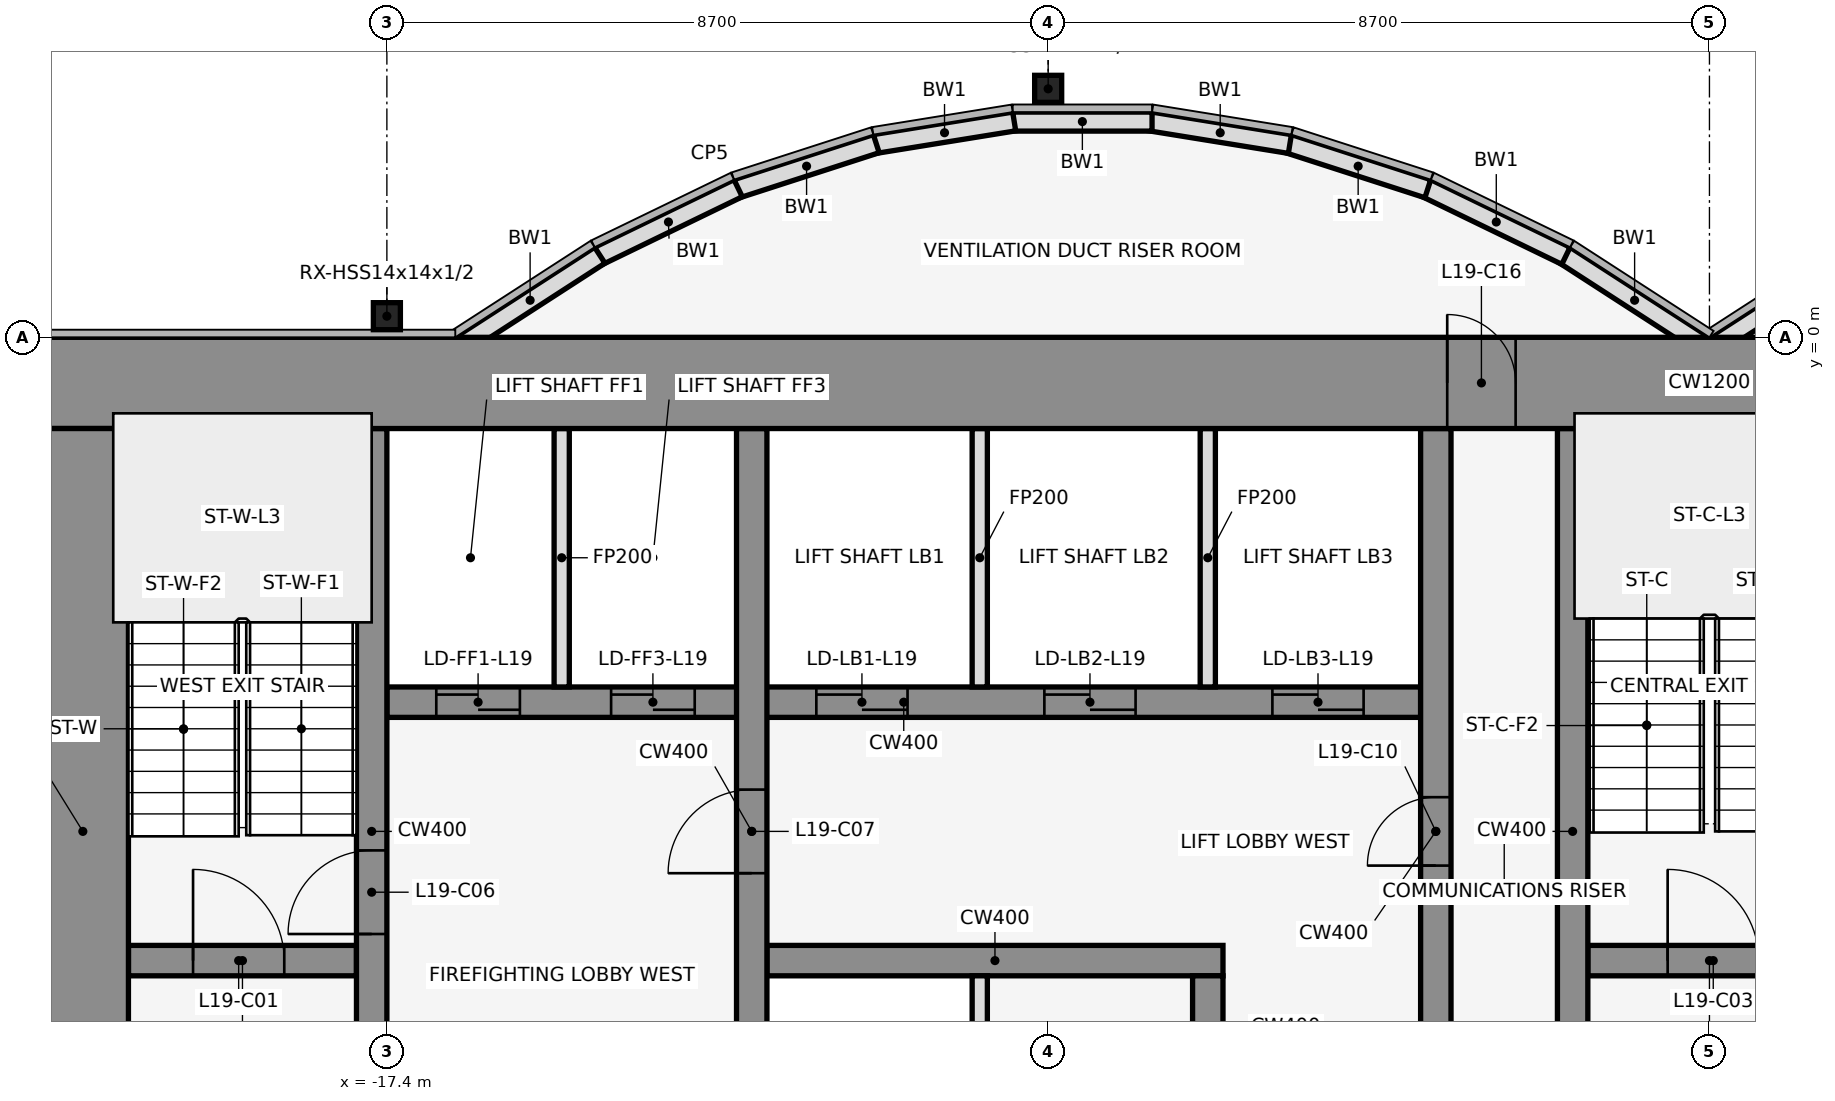
"""IFC4 building model, lengths in metres.
Left out: names, types, materials, properties, quantities, classifications, styles, units other than length and angle.
Written with IfcOpenShell. Run it as: python <this file> out.ifc"""

import sys

from ifc_helpers import new_model, si_unit, direction, frame, frame_2d, origin, origin_2d, place, context, subcontext, project, spatial, rectangle, hollow_rectangle, extrude, element, fill, save


model = new_model("IFC4")
c1 = context("Model", 3, precision=1e-05, world=origin(), true_north=direction((0.0, 1.0)))
c2 = subcontext(c1, "Body", "Model", "MODEL_VIEW")
j1 = project(units=[si_unit("LENGTHUNIT", "METRE"), si_unit("PLANEANGLEUNIT", "RADIAN")], contexts=[c1])
p1 = place(None, origin())
s1 = spatial("IfcSite", under=j1, at=p1, CompositionType="ELEMENT")
p2 = place(p1, origin())
s2 = spatial("IfcBuilding", under=s1, at=p2, CompositionType="ELEMENT")
p3 = place(p2, frame((0.0, 0.0, 94.0)))
s3 = spatial("IfcBuildingStorey", under=s2, at=p3, CompositionType="ELEMENT", Elevation=94.0)
for number, where, z_axis, x_axis in (
    (1, (-8.7, 3.269, 0.0), (0.0, 0.0, 1.0), (1.0, 0.0, 0.0)),
    (2, (-17.4, 0.278, 0.0), (0.0, 0.0, 1.0), (1.0, 0.0, 0.0)),
):
    element("IfcColumn", number, at=place(p3, frame(where, z_axis=z_axis, x_axis=x_axis)), inside=s3, PredefinedType="COLUMN", context=c2, shape_type="SweptSolid", body=[
        extrude(hollow_rectangle(XDim=0.356, YDim=0.356, WallThickness=0.012, at=origin_2d()), origin(), (0.0, 0.0, 1.0), 4.1),
    ])
for number, where, z_axis, x_axis in (
    (3, (1.901, 1.08, 0.0), (0.0, 0.0, 1.0), (-0.84, -0.543, 0.0)),
    (4, (-0.068, -0.105, 0.0), (0.0, 0.0, 1.0), (-0.84, 0.543, 0.0)),
):
    element("IfcWall", number, at=place(p3, frame(where, z_axis=z_axis, x_axis=x_axis)), inside=s3, PredefinedType="STANDARD", context=c2, shape_type="SweptSolid", body=[
        extrude(rectangle(XDim=2.183, YDim=0.25, at=frame_2d((1.091, 0.0))), origin(), (0.0, 0.0, 1.0), 3.95),
    ])
p4 = place(p3, frame((-1.888, 1.073, 0.0), z_axis=(0.0, 0.0, 1.0), x_axis=(-0.89982408427, 0.436252928206, 0.0)))
e5 = element("IfcWall", 5, at=p4, inside=s3, PredefinedType="STANDARD", context=c2, shape_type="SweptSolid", body=[
    extrude(rectangle(XDim=2.038, YDim=0.25, at=frame_2d((1.019, 0.0))), origin(), (0.0, 0.0, 1.0), 3.95),
])
p5 = place(p3, frame((-3.705, 1.955, 0.0), z_axis=(0.0, 0.0, 1.0), x_axis=(-0.951495806175, 0.307661714928, 0.0)))
e6 = element("IfcWall", 6, at=p5, inside=s3, PredefinedType="STANDARD", context=c2, shape_type="SweptSolid", body=[
    extrude(rectangle(XDim=1.927, YDim=0.25, at=frame_2d((0.963, 0.0))), origin(), (0.0, 0.0, 1.0), 3.95),
])
p6 = place(p3, frame((-5.52, 2.543, 0.0), z_axis=(0.0, 0.0, 1.0), x_axis=(-0.987181718931, 0.159600293885, 0.0)))
e7 = element("IfcWall", 7, at=p6, inside=s3, PredefinedType="STANDARD", context=c2, shape_type="SweptSolid", body=[
    extrude(rectangle(XDim=1.857, YDim=0.25, at=frame_2d((0.929, 0.0))), origin(), (0.0, 0.0, 1.0), 3.95),
])
p7 = place(p3, frame((-7.333, 2.838, 0.0), z_axis=(0.0, 0.0, 1.0), x_axis=(-1.0, 0.0, 0.0)))
e8 = element("IfcWall", 8, at=p7, inside=s3, PredefinedType="STANDARD", context=c2, shape_type="SweptSolid", body=[
    extrude(rectangle(XDim=1.833, YDim=0.25, at=frame_2d((0.917, 0.0))), origin(), (0.0, 0.0, 1.0), 3.95),
])
p8 = place(p3, frame((-9.147, 2.84, 0.0), z_axis=(0.0, 0.0, 1.0), x_axis=(-0.987181718931, -0.159600293885, 0.0)))
e9 = element("IfcWall", 9, at=p8, inside=s3, PredefinedType="STANDARD", context=c2, shape_type="SweptSolid", body=[
    extrude(rectangle(XDim=1.857, YDim=0.25, at=frame_2d((0.929, 0.0))), origin(), (0.0, 0.0, 1.0), 3.95),
])
p9 = place(p3, frame((-10.962, 2.548, 0.0), z_axis=(0.0, 0.0, 1.0), x_axis=(-0.951495806175, -0.307661714928, 0.0)))
e10 = element("IfcWall", 10, at=p9, inside=s3, PredefinedType="STANDARD", context=c2, shape_type="SweptSolid", body=[
    extrude(rectangle(XDim=1.927, YDim=0.25, at=frame_2d((0.963, 0.0))), origin(), (0.0, 0.0, 1.0), 3.95),
])
p10 = place(p3, frame((-12.779, 1.962, 0.0), z_axis=(0.0, 0.0, 1.0), x_axis=(-0.89982408427, -0.436252928206, 0.0)))
e11 = element("IfcWall", 11, at=p10, inside=s3, PredefinedType="STANDARD", context=c2, shape_type="SweptSolid", body=[
    extrude(rectangle(XDim=2.038, YDim=0.25, at=frame_2d((1.019, 0.0))), origin(), (0.0, 0.0, 1.0), 3.95),
])
p11 = place(p3, frame((-14.599, 1.08, 0.0), z_axis=(0.0, 0.0, 1.0), x_axis=(-0.83981312244, -0.542875602121, 0.0)))
e12 = element("IfcWall", 12, at=p11, inside=s3, PredefinedType="STANDARD", context=c2, shape_type="SweptSolid", body=[
    extrude(rectangle(XDim=2.183, YDim=0.25, at=frame_2d((1.091, 0.0))), origin(), (0.0, 0.0, 1.0), 3.95),
])
p12 = place(p3, frame((-20.8, -8.2, 0.0), z_axis=(0.0, 0.0, 1.0), x_axis=(1.0, 0.0, 0.0)))
e13 = element("IfcWall", 13, at=p12, inside=s3, PredefinedType="SHEAR", context=c2, shape_type="SweptSolid", body=[
    extrude(rectangle(XDim=3.0, YDim=0.4, at=frame_2d((1.5, 0.0))), origin(), (0.0, 0.0, 1.0), 4.1),
])
p13 = place(p12, frame((0.85, 0.0, 0.0)))
e14 = element("IfcOpeningElement", 14, at=p13, cuts=e13, PredefinedType="OPENING", context=c2, shape_type="SweptSolid", body=[
    extrude(rectangle(XDim=1.2, YDim=2.1, at=frame_2d((0.6, 1.05))), frame((0.0, 0.212, 0.0), z_axis=(0.0, -1.0, 0.0), x_axis=(1.0, 0.0, 0.0)), (0.0, 0.0, 1.0), 0.424),
])
p14 = place(p3, frame((-12.4, -8.2, 0.0), z_axis=(0.0, 0.0, 1.0), x_axis=(1.0, 0.0, 0.0)))
e15 = element("IfcWall", 15, at=p14, inside=s3, PredefinedType="SHEAR", context=c2, shape_type="SweptSolid", body=[
    extrude(rectangle(XDim=6.0, YDim=0.4, at=frame_2d((3.0, 0.0))), origin(), (0.0, 0.0, 1.0), 4.1),
])
p15 = place(p3, frame((-1.6, -8.2, 0.0), z_axis=(0.0, 0.0, 1.0), x_axis=(1.0, 0.0, 0.0)))
e16 = element("IfcWall", 16, at=p15, inside=s3, PredefinedType="SHEAR", context=c2, shape_type="SweptSolid", body=[
    extrude(rectangle(XDim=3.2, YDim=0.4, at=frame_2d((1.6, 0.0))), origin(), (0.0, 0.0, 1.0), 4.1),
])
p16 = place(p15, frame((1.05, 0.0, 0.0)))
e17 = element("IfcOpeningElement", 17, at=p16, cuts=e16, PredefinedType="OPENING", context=c2, shape_type="SweptSolid", body=[
    extrude(rectangle(XDim=1.2, YDim=2.1, at=frame_2d((0.6, 1.05))), frame((0.0, 0.212, 0.0), z_axis=(0.0, -1.0, 0.0), x_axis=(1.0, 0.0, 0.0)), (0.0, 0.0, 1.0), 0.424),
])
p17 = place(p3, frame((-17.4, -4.8, 0.0), z_axis=(0.0, 0.0, 1.0), x_axis=(1.0, 0.0, 0.0)))
e18 = element("IfcWall", 18, at=p17, inside=s3, PredefinedType="SHEAR", context=c2, shape_type="SweptSolid", body=[
    extrude(rectangle(XDim=13.6, YDim=0.4, at=frame_2d((6.8, 0.0))), origin(), (0.0, 0.0, 1.0), 4.1),
])
p18 = place(p17, frame((0.65, 0.0, 0.0)))
e19 = element("IfcOpeningElement", 19, at=p18, cuts=e18, PredefinedType="OPENING", context=c2, shape_type="SweptSolid", body=[
    extrude(rectangle(XDim=1.1, YDim=2.1, at=frame_2d((0.55, 1.05))), frame((0.0, 0.212, 0.0), z_axis=(0.0, -1.0, 0.0), x_axis=(1.0, 0.0, 0.0)), (0.0, 0.0, 1.0), 0.424),
])
p19 = place(p17, frame((2.95, 0.0, 0.0)))
e20 = element("IfcOpeningElement", 20, at=p19, cuts=e18, PredefinedType="OPENING", context=c2, shape_type="SweptSolid", body=[
    extrude(rectangle(XDim=1.1, YDim=2.1, at=frame_2d((0.55, 1.05))), frame((0.0, 0.212, 0.0), z_axis=(0.0, -1.0, 0.0), x_axis=(1.0, 0.0, 0.0)), (0.0, 0.0, 1.0), 0.424),
])
p20 = place(p17, frame((5.65, 0.0, 0.0)))
e21 = element("IfcOpeningElement", 21, at=p20, cuts=e18, PredefinedType="OPENING", context=c2, shape_type="SweptSolid", body=[
    extrude(rectangle(XDim=1.2, YDim=2.1, at=frame_2d((0.6, 1.05))), frame((0.0, 0.212, 0.0), z_axis=(0.0, -1.0, 0.0), x_axis=(1.0, 0.0, 0.0)), (0.0, 0.0, 1.0), 0.424),
])
p21 = place(p17, frame((8.65, 0.0, 0.0)))
e22 = element("IfcOpeningElement", 22, at=p21, cuts=e18, PredefinedType="OPENING", context=c2, shape_type="SweptSolid", body=[
    extrude(rectangle(XDim=1.2, YDim=2.1, at=frame_2d((0.6, 1.05))), frame((0.0, 0.212, 0.0), z_axis=(0.0, -1.0, 0.0), x_axis=(1.0, 0.0, 0.0)), (0.0, 0.0, 1.0), 0.424),
])
p22 = place(p17, frame((11.65, 0.0, 0.0)))
e23 = element("IfcOpeningElement", 23, at=p22, cuts=e18, PredefinedType="OPENING", context=c2, shape_type="SweptSolid", body=[
    extrude(rectangle(XDim=1.2, YDim=2.1, at=frame_2d((0.6, 1.05))), frame((0.0, 0.212, 0.0), z_axis=(0.0, -1.0, 0.0), x_axis=(1.0, 0.0, 0.0)), (0.0, 0.0, 1.0), 0.424),
])
p23 = place(p3, frame((-17.6, -11.8, 0.0), z_axis=(0.0, 0.0, 1.0), x_axis=(0.0, 1.0, 0.0)))
e24 = element("IfcWall", 24, at=p23, inside=s3, PredefinedType="SHEAR", context=c2, shape_type="SweptSolid", body=[
    extrude(rectangle(XDim=10.6, YDim=0.4, at=frame_2d((5.3, 0.0))), origin(), (0.0, 0.0, 1.0), 4.1),
])
p24 = place(p23, frame((1.25, 0.0, 0.0)))
e25 = element("IfcOpeningElement", 25, at=p24, cuts=e24, PredefinedType="OPENING", context=c2, shape_type="SweptSolid", body=[
    extrude(rectangle(XDim=1.1, YDim=2.1, at=frame_2d((0.55, 1.05))), frame((0.0, 0.212, 0.0), z_axis=(0.0, -1.0, 0.0), x_axis=(1.0, 0.0, 0.0)), (0.0, 0.0, 1.0), 0.424),
])
p25 = place(p23, frame((3.95, 0.0, 0.0)))
e26 = element("IfcOpeningElement", 26, at=p25, cuts=e24, PredefinedType="OPENING", context=c2, shape_type="SweptSolid", body=[
    extrude(rectangle(XDim=1.1, YDim=2.1, at=frame_2d((0.55, 1.05))), frame((0.0, 0.212, 0.0), z_axis=(0.0, -1.0, 0.0), x_axis=(1.0, 0.0, 0.0)), (0.0, 0.0, 1.0), 0.424),
])
p26 = place(p3, frame((-15.1, -4.6, 0.0), z_axis=(0.0, 0.0, 1.0), x_axis=(0.0, 1.0, 0.0)))
e27 = element("IfcWall", 27, at=p26, inside=s3, PredefinedType="PARTITIONING", context=c2, shape_type="SweptSolid", body=[
    extrude(rectangle(XDim=3.4, YDim=0.2, at=frame_2d((1.7, 0.0))), origin(), (0.0, 0.0, 1.0), 3.018),
])
p27 = place(p3, frame((-12.6, -11.8, 0.0), z_axis=(0.0, 0.0, 1.0), x_axis=(0.0, 1.0, 0.0)))
e28 = element("IfcWall", 28, at=p27, inside=s3, PredefinedType="SHEAR", context=c2, shape_type="SweptSolid", body=[
    extrude(rectangle(XDim=10.6, YDim=0.4, at=frame_2d((5.3, 0.0))), origin(), (0.0, 0.0, 1.0), 4.1),
])
p28 = place(p27, frame((4.75, 0.0, 0.0)))
e29 = element("IfcOpeningElement", 29, at=p28, cuts=e28, PredefinedType="OPENING", context=c2, shape_type="SweptSolid", body=[
    extrude(rectangle(XDim=1.1, YDim=2.1, at=frame_2d((0.55, 1.05))), frame((0.0, 0.212, 0.0), z_axis=(0.0, -1.0, 0.0), x_axis=(1.0, 0.0, 0.0)), (0.0, 0.0, 1.0), 0.424),
])
for number, where, z_axis, x_axis in (
    (30, (-9.6, -11.8, 0.0), (0.0, 0.0, 1.0), (0.0, 1.0, 0.0)),
    (31, (-9.6, -4.6, 0.0), (0.0, 0.0, 1.0), (0.0, 1.0, 0.0)),
):
    element("IfcWall", number, at=place(p3, frame(where, z_axis=z_axis, x_axis=x_axis)), inside=s3, PredefinedType="PARTITIONING", context=c2, shape_type="SweptSolid", body=[
        extrude(rectangle(XDim=3.4, YDim=0.2, at=frame_2d((1.7, 0.0))), origin(), (0.0, 0.0, 1.0), 3.018),
    ])
p29 = place(p3, frame((-6.6, -11.8, 0.0), z_axis=(0.0, 0.0, 1.0), x_axis=(0.0, 1.0, 0.0)))
e32 = element("IfcWall", 32, at=p29, inside=s3, PredefinedType="SHEAR", context=c2, shape_type="SweptSolid", body=[
    extrude(rectangle(XDim=3.4, YDim=0.4, at=frame_2d((1.7, 0.0))), origin(), (0.0, 0.0, 1.0), 4.1),
])
p30 = place(p29, frame((1.25, 0.0, 0.0)))
e33 = element("IfcOpeningElement", 33, at=p30, cuts=e32, PredefinedType="OPENING", context=c2, shape_type="SweptSolid", body=[
    extrude(rectangle(XDim=0.9, YDim=2.1, at=frame_2d((0.45, 1.05))), frame((0.0, 0.212, 0.0), z_axis=(0.0, -1.0, 0.0), x_axis=(1.0, 0.0, 0.0)), (0.0, 0.0, 1.0), 0.424),
])
p31 = place(p3, frame((-6.6, -4.6, 0.0), z_axis=(0.0, 0.0, 1.0), x_axis=(0.0, 1.0, 0.0)))
e34 = element("IfcWall", 34, at=p31, inside=s3, PredefinedType="PARTITIONING", context=c2, shape_type="SweptSolid", body=[
    extrude(rectangle(XDim=3.4, YDim=0.2, at=frame_2d((1.7, 0.0))), origin(), (0.0, 0.0, 1.0), 3.018),
])
p32 = place(p3, frame((-3.6, -11.8, 0.0), z_axis=(0.0, 0.0, 1.0), x_axis=(0.0, 1.0, 0.0)))
e35 = element("IfcWall", 35, at=p32, inside=s3, PredefinedType="SHEAR", context=c2, shape_type="SweptSolid", body=[
    extrude(rectangle(XDim=10.6, YDim=0.4, at=frame_2d((5.3, 0.0))), origin(), (0.0, 0.0, 1.0), 4.1),
])
p33 = place(p32, frame((4.85, 0.0, 0.0)))
e36 = element("IfcOpeningElement", 36, at=p33, cuts=e35, PredefinedType="OPENING", context=c2, shape_type="SweptSolid", body=[
    extrude(rectangle(XDim=0.9, YDim=2.1, at=frame_2d((0.45, 1.05))), frame((0.0, 0.212, 0.0), z_axis=(0.0, -1.0, 0.0), x_axis=(1.0, 0.0, 0.0)), (0.0, 0.0, 1.0), 0.424),
])
p34 = place(p3, frame((-1.8, -11.8, 0.0), z_axis=(0.0, 0.0, 1.0), x_axis=(0.0, 1.0, 0.0)))
e37 = element("IfcWall", 37, at=p34, inside=s3, PredefinedType="SHEAR", context=c2, shape_type="SweptSolid", body=[
    extrude(rectangle(XDim=10.6, YDim=0.4, at=frame_2d((5.3, 0.0))), origin(), (0.0, 0.0, 1.0), 4.1),
])
p35 = place(p3, frame((-22.0, -0.6, 0.0), z_axis=(0.0, 0.0, 1.0), x_axis=(1.0, 0.0, 0.0)))
e38 = element("IfcWall", 38, at=p35, inside=s3, PredefinedType="SHEAR", context=c2, shape_type="SweptSolid", body=[
    extrude(rectangle(XDim=44.0, YDim=1.2, at=frame_2d((22.0, 0.0))), origin(), (0.0, 0.0, 1.0), 4.1),
])
p36 = place(p35, frame((18.55, 0.0, 0.0)))
e39 = element("IfcOpeningElement", 39, at=p36, cuts=e38, PredefinedType="OPENING", context=c2, shape_type="SweptSolid", body=[
    extrude(rectangle(XDim=0.9, YDim=2.1, at=frame_2d((0.45, 1.05))), frame((0.0, 0.612, 0.0), z_axis=(0.0, -1.0, 0.0), x_axis=(1.0, 0.0, 0.0)), (0.0, 0.0, 1.0), 1.224),
])
p37 = place(p35, frame((24.55, 0.0, 0.0)))
e40 = element("IfcOpeningElement", 40, at=p37, cuts=e38, PredefinedType="OPENING", context=c2, shape_type="SweptSolid", body=[
    extrude(rectangle(XDim=0.9, YDim=2.1, at=frame_2d((0.45, 1.05))), frame((0.0, 0.612, 0.0), z_axis=(0.0, -1.0, 0.0), x_axis=(1.0, 0.0, 0.0)), (0.0, 0.0, 1.0), 1.224),
])
p38 = place(p3, frame((-21.4, -11.8, 0.0), z_axis=(0.0, 0.0, 1.0), x_axis=(0.0, 1.0, 0.0)))
e41 = element("IfcWall", 41, at=p38, inside=s3, PredefinedType="SHEAR", context=c2, shape_type="SweptSolid", body=[
    extrude(rectangle(XDim=10.6, YDim=1.2, at=frame_2d((5.3, 0.0))), origin(), (0.0, 0.0, 1.0), 4.1),
])
p39 = place(p13, origin())
e42 = element("IfcDoor", 42, at=p39, inside=s3, OperationType="SINGLE_SWING_LEFT", PredefinedType="DOOR", context=c2, shape_type="SweptSolid", body=[
    extrude(rectangle(XDim=1.2, YDim=2.1, at=frame_2d((0.6, 1.05))), frame((0.0, 0.025, 0.0), z_axis=(0.0, -1.0, 0.0), x_axis=(1.0, 0.0, 0.0)), (0.0, 0.0, 1.0), 0.05),
])
fill(e14, e42)
p40 = place(p16, origin())
e43 = element("IfcDoor", 43, at=p40, inside=s3, OperationType="SINGLE_SWING_LEFT", PredefinedType="DOOR", context=c2, shape_type="SweptSolid", body=[
    extrude(rectangle(XDim=1.2, YDim=2.1, at=frame_2d((0.6, 1.05))), frame((0.0, 0.025, 0.0), z_axis=(0.0, -1.0, 0.0), x_axis=(1.0, 0.0, 0.0)), (0.0, 0.0, 1.0), 0.05),
])
fill(e17, e43)
p41 = place(p18, origin())
e44 = element("IfcDoor", 44, at=p41, inside=s3, OperationType="DOUBLE_DOOR_SLIDING", PredefinedType="DOOR", context=c2, shape_type="SweptSolid", body=[
    extrude(rectangle(XDim=1.1, YDim=2.1, at=frame_2d((0.55, 1.05))), frame((0.0, 0.025, 0.0), z_axis=(0.0, -1.0, 0.0), x_axis=(1.0, 0.0, 0.0)), (0.0, 0.0, 1.0), 0.05),
])
fill(e19, e44)
p42 = place(p19, origin())
e45 = element("IfcDoor", 45, at=p42, inside=s3, OperationType="DOUBLE_DOOR_SLIDING", PredefinedType="DOOR", context=c2, shape_type="SweptSolid", body=[
    extrude(rectangle(XDim=1.1, YDim=2.1, at=frame_2d((0.55, 1.05))), frame((0.0, 0.025, 0.0), z_axis=(0.0, -1.0, 0.0), x_axis=(1.0, 0.0, 0.0)), (0.0, 0.0, 1.0), 0.05),
])
fill(e20, e45)
p43 = place(p20, origin())
e46 = element("IfcDoor", 46, at=p43, inside=s3, OperationType="DOUBLE_DOOR_SLIDING", PredefinedType="DOOR", context=c2, shape_type="SweptSolid", body=[
    extrude(rectangle(XDim=1.2, YDim=2.1, at=frame_2d((0.6, 1.05))), frame((0.0, 0.025, 0.0), z_axis=(0.0, -1.0, 0.0), x_axis=(1.0, 0.0, 0.0)), (0.0, 0.0, 1.0), 0.05),
])
fill(e21, e46)
p44 = place(p21, origin())
e47 = element("IfcDoor", 47, at=p44, inside=s3, OperationType="DOUBLE_DOOR_SLIDING", PredefinedType="DOOR", context=c2, shape_type="SweptSolid", body=[
    extrude(rectangle(XDim=1.2, YDim=2.1, at=frame_2d((0.6, 1.05))), frame((0.0, 0.025, 0.0), z_axis=(0.0, -1.0, 0.0), x_axis=(1.0, 0.0, 0.0)), (0.0, 0.0, 1.0), 0.05),
])
fill(e22, e47)
p45 = place(p22, origin())
e48 = element("IfcDoor", 48, at=p45, inside=s3, OperationType="DOUBLE_DOOR_SLIDING", PredefinedType="DOOR", context=c2, shape_type="SweptSolid", body=[
    extrude(rectangle(XDim=1.2, YDim=2.1, at=frame_2d((0.6, 1.05))), frame((0.0, 0.025, 0.0), z_axis=(0.0, -1.0, 0.0), x_axis=(1.0, 0.0, 0.0)), (0.0, 0.0, 1.0), 0.05),
])
fill(e23, e48)
p46 = place(p25, frame((1.1, 0.0, 0.0), z_axis=(0.0, 0.0, 1.0), x_axis=(-1.0, 0.0, 0.0)))
e49 = element("IfcDoor", 49, at=p46, inside=s3, OperationType="SINGLE_SWING_LEFT", PredefinedType="DOOR", context=c2, shape_type="SweptSolid", body=[
    extrude(rectangle(XDim=1.1, YDim=2.1, at=frame_2d((0.55, 1.05))), frame((0.0, 0.025, 0.0), z_axis=(0.0, -1.0, 0.0), x_axis=(1.0, 0.0, 0.0)), (0.0, 0.0, 1.0), 0.05),
])
fill(e26, e49)
p47 = place(p28, origin())
e50 = element("IfcDoor", 50, at=p47, inside=s3, OperationType="SINGLE_SWING_LEFT", PredefinedType="DOOR", context=c2, shape_type="SweptSolid", body=[
    extrude(rectangle(XDim=1.1, YDim=2.1, at=frame_2d((0.55, 1.05))), frame((0.0, 0.025, 0.0), z_axis=(0.0, -1.0, 0.0), x_axis=(1.0, 0.0, 0.0)), (0.0, 0.0, 1.0), 0.05),
])
fill(e29, e50)
p48 = place(p33, frame((0.9, 0.0, 0.0), z_axis=(0.0, 0.0, 1.0), x_axis=(-1.0, 0.0, 0.0)))
e51 = element("IfcDoor", 51, at=p48, inside=s3, OperationType="SINGLE_SWING_LEFT", PredefinedType="DOOR", context=c2, shape_type="SweptSolid", body=[
    extrude(rectangle(XDim=0.9, YDim=2.1, at=frame_2d((0.45, 1.05))), frame((0.0, 0.025, 0.0), z_axis=(0.0, -1.0, 0.0), x_axis=(1.0, 0.0, 0.0)), (0.0, 0.0, 1.0), 0.05),
])
fill(e36, e51)
p49 = place(p36, origin())
e52 = element("IfcDoor", 52, at=p49, inside=s3, OperationType="SINGLE_SWING_LEFT", PredefinedType="DOOR", context=c2, shape_type="SweptSolid", body=[
    extrude(rectangle(XDim=0.9, YDim=2.1, at=frame_2d((0.45, 1.05))), frame((0.0, 0.025, 0.0), z_axis=(0.0, -1.0, 0.0), x_axis=(1.0, 0.0, 0.0)), (0.0, 0.0, 1.0), 0.05),
])
fill(e39, e52)
save(model, sys.argv[1])
